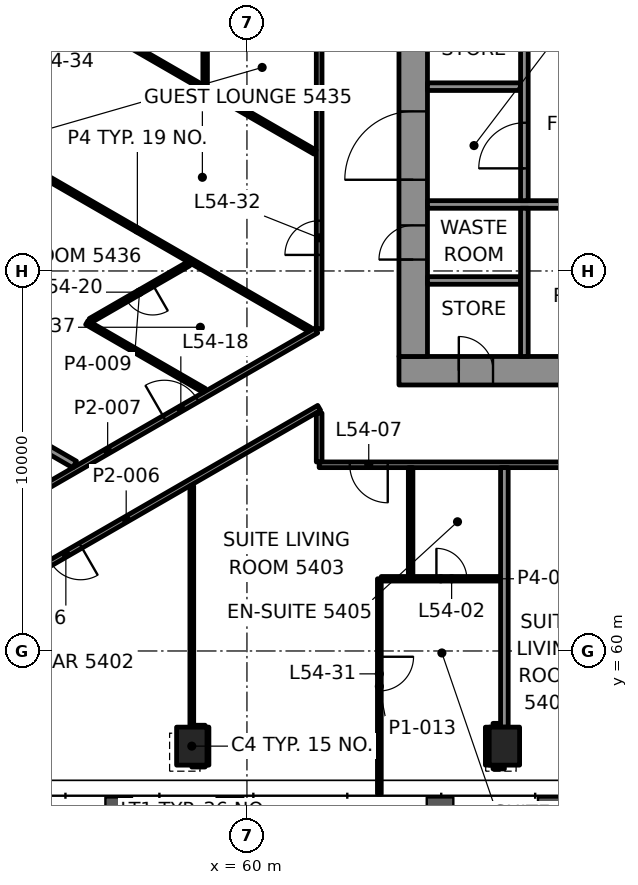
"""IFC4 building model, lengths in metres.
Left out: names, types, materials, properties, quantities, classifications, styles, units other than length and angle.
Written with IfcOpenShell. Run it as: python <this file> out.ifc"""

import sys

from ifc_helpers import new_model, si_unit, direction, frame, frame_2d, origin, origin_2d, place, context, subcontext, project, spatial, rectangle, hollow_rectangle, extrude, element, fill, save


model = new_model("IFC4")
c1 = context("Model", 3, precision=1e-05, world=origin(), true_north=direction((0.0, 1.0)))
c2 = subcontext(c1, "Body", "Model", "MODEL_VIEW")
j1 = project(units=[si_unit("LENGTHUNIT", "METRE"), si_unit("PLANEANGLEUNIT", "RADIAN")], contexts=[c1])
p1 = place(None, origin())
s1 = spatial("IfcSite", under=j1, at=p1, CompositionType="ELEMENT")
p2 = place(p1, origin())
s2 = spatial("IfcBuilding", under=s1, at=p2, CompositionType="ELEMENT")
p3 = place(p2, frame((0.0, 0.0, 229.9)))
s3 = spatial("IfcBuildingStorey", under=s2, at=p3, CompositionType="ELEMENT", Elevation=229.9)
for number, where, z_axis, x_axis in (
    (1, (58.549, 57.496, -0.0), (0.0, 0.0, 1.0), (1.0, 0.0, 0.0)),
    (2, (66.774, 57.496, -0.0), (0.0, 0.0, 1.0), (1.0, 0.0, 0.0)),
):
    element("IfcColumn", number, at=place(p3, frame(where, z_axis=z_axis, x_axis=x_axis)), inside=s3, PredefinedType="COLUMN", context=c2, shape_type="SweptSolid", body=[
        extrude(hollow_rectangle(XDim=0.8, YDim=1.0, WallThickness=0.05, at=origin_2d()), origin(), (0.0, 0.0, 1.0), 3.9),
    ])
p4 = place(p3, frame((64.0, 67.375, 0.0), z_axis=(0.0, 0.0, 1.0), x_axis=(1.0, 0.0, 0.0)))
e3 = element("IfcWall", 3, at=p4, inside=s3, PredefinedType="SHEAR", context=c2, shape_type="SweptSolid", body=[
    extrude(rectangle(XDim=22.0, YDim=0.75, at=frame_2d((11.0, 0.0))), origin(), (0.0, 0.0, 1.0), 3.7),
])
p5 = place(p4, frame((1.575, 0.0, 0.0)))
e4 = element("IfcOpeningElement", 4, at=p5, cuts=e3, PredefinedType="OPENING", context=c2, shape_type="SweptSolid", body=[
    extrude(rectangle(XDim=0.9, YDim=2.1, at=frame_2d((0.45, 1.05))), frame((0.0, 0.385, 0.0), z_axis=(0.0, -1.0, 0.0), x_axis=(1.0, 0.0, 0.0)), (0.0, 0.0, 1.0), 0.77),
])
p6 = place(p4, frame((4.425, 0.0, 0.0)))
e5 = element("IfcOpeningElement", 5, at=p6, cuts=e3, PredefinedType="OPENING", context=c2, shape_type="SweptSolid", body=[
    extrude(rectangle(XDim=0.9, YDim=2.1, at=frame_2d((0.45, 1.05))), frame((0.0, 0.385, 0.0), z_axis=(0.0, -1.0, 0.0), x_axis=(1.0, 0.0, 0.0)), (0.0, 0.0, 1.0), 0.77),
])
p7 = place(p3, frame((64.375, 67.75, 0.0), z_axis=(0.0, 0.0, 1.0), x_axis=(0.0, 1.0, 0.0)))
e6 = element("IfcWall", 6, at=p7, inside=s3, PredefinedType="SHEAR", context=c2, shape_type="SweptSolid", body=[
    extrude(rectangle(XDim=14.5, YDim=0.75, at=frame_2d((7.25, 0.0))), origin(), (0.0, 0.0, 1.0), 3.7),
])
p8 = place(p7, frame((4.65, 0.0, 0.0)))
e7 = element("IfcOpeningElement", 7, at=p8, cuts=e6, PredefinedType="OPENING", context=c2, shape_type="SweptSolid", body=[
    extrude(rectangle(XDim=1.8, YDim=2.1, at=frame_2d((0.9, 1.05))), frame((0.0, 0.385, 0.0), z_axis=(0.0, -1.0, 0.0), x_axis=(1.0, 0.0, 0.0)), (0.0, 0.0, 1.0), 0.77),
])
p9 = place(p7, frame((2.55, 0.0, 0.0)))
e8 = element("IfcOpeningElement", 8, at=p9, cuts=e6, PredefinedType="OPENING", context=c2, shape_type="SweptSolid", body=[
    extrude(rectangle(XDim=0.9, YDim=2.1, at=frame_2d((0.45, 1.05))), frame((0.0, 0.385, 0.0), z_axis=(0.0, -1.0, 0.0), x_axis=(1.0, 0.0, 0.0)), (0.0, 0.0, 1.0), 0.77),
])
p10 = place(p7, frame((10.35, 0.0, 0.0)))
e9 = element("IfcOpeningElement", 9, at=p10, cuts=e6, PredefinedType="OPENING", context=c2, shape_type="SweptSolid", body=[
    extrude(rectangle(XDim=0.9, YDim=2.1, at=frame_2d((0.45, 1.05))), frame((0.0, 0.385, 0.0), z_axis=(0.0, -1.0, 0.0), x_axis=(1.0, 0.0, 0.0)), (0.0, 0.0, 1.0), 0.77),
])
p11 = place(p3, frame((58.549, 56.996, 0.0), z_axis=(0.0, 0.0, 1.0), x_axis=(1.0, 0.0, 0.0)))
e10 = element("IfcWall", 10, at=p11, inside=s3, PredefinedType="PARTITIONING", context=c2, shape_type="SweptSolid", body=[
    extrude(rectangle(XDim=0.35, YDim=0.1, at=frame_2d((0.175, 0.0))), origin(), (0.0, 0.0, 1.0), 3.1),
])
p12 = place(p3, frame((66.475, 56.996, 0.0), z_axis=(0.0, 0.0, 1.0), x_axis=(1.0, 0.0, 0.0)))
e11 = element("IfcWall", 11, at=p12, inside=s3, PredefinedType="PARTITIONING", context=c2, shape_type="SweptSolid", body=[
    extrude(rectangle(XDim=0.299, YDim=0.2, at=frame_2d((0.149, 0.0))), origin(), (0.0, 0.0, 1.0), 3.1),
])
p13 = place(p3, frame((58.609, 57.996, 0.0), z_axis=(0.0, 0.0, 1.0), x_axis=(1.0, 0.0, 0.0)))
e12 = element("IfcWall", 12, at=p13, inside=s3, PredefinedType="PARTITIONING", context=c2, shape_type="SweptSolid", body=[
    extrude(rectangle(XDim=0.29, YDim=0.1, at=frame_2d((0.145, 0.0))), origin(), (0.0, 0.0, 1.0), 3.1),
])
p14 = place(p3, frame((66.475, 57.996, 0.0), z_axis=(0.0, 0.0, 1.0), x_axis=(1.0, 0.0, 0.0)))
e13 = element("IfcWall", 13, at=p14, inside=s3, PredefinedType="PARTITIONING", context=c2, shape_type="SweptSolid", body=[
    extrude(rectangle(XDim=0.199, YDim=0.2, at=frame_2d((0.1, 0.0))), origin(), (0.0, 0.0, 1.0), 3.1),
])
p15 = place(p3, frame((63.534, 61.9, 0.0), z_axis=(0.0, 0.0, 1.0), x_axis=(1.0, 0.0, 0.0)))
e14 = element("IfcWall", 14, at=p15, inside=s3, PredefinedType="PARTITIONING", context=c2, shape_type="SweptSolid", body=[
    extrude(rectangle(XDim=3.13, YDim=0.12, at=frame_2d((1.565, 0.0))), origin(), (0.0, 0.0, 1.0), 3.1),
])
p16 = place(p15, frame((1.451, 0.0, 0.0)))
e15 = element("IfcOpeningElement", 15, at=p16, cuts=e14, PredefinedType="OPENING", context=c2, shape_type="SweptSolid", body=[
    extrude(rectangle(XDim=0.8, YDim=2.1, at=frame_2d((0.4, 1.05))), frame((0.0, 0.07, 0.0), z_axis=(0.0, -1.0, 0.0), x_axis=(1.0, 0.0, 0.0)), (0.0, 0.0, 1.0), 0.14),
])
p17 = place(p3, frame((88.099, 64.9, 0.0), z_axis=(0.0, 0.0, 1.0), x_axis=(-1.0, 0.0, 0.0)))
e16 = element("IfcWall", 16, at=p17, inside=s3, PredefinedType="PARTITIONING", context=c2, shape_type="SweptSolid", body=[
    extrude(rectangle(XDim=26.199, YDim=0.15, at=frame_2d((13.1, 0.0))), origin(), (0.0, 0.0, 1.0), 3.1),
])
p18 = place(p17, frame((2.088, 0.0, 0.0)))
e17 = element("IfcOpeningElement", 17, at=p18, cuts=e16, PredefinedType="OPENING", context=c2, shape_type="SweptSolid", body=[
    extrude(rectangle(XDim=0.9, YDim=2.1, at=frame_2d((0.45, 1.05))), frame((0.0, 0.085, 0.0), z_axis=(0.0, -1.0, 0.0), x_axis=(1.0, 0.0, 0.0)), (0.0, 0.0, 1.0), 0.17),
])
p19 = place(p17, frame((5.4, 0.0, 0.0)))
e18 = element("IfcOpeningElement", 18, at=p19, cuts=e16, PredefinedType="OPENING", context=c2, shape_type="SweptSolid", body=[
    extrude(rectangle(XDim=1.0, YDim=2.1, at=frame_2d((0.5, 1.05))), frame((0.0, 0.085, 0.0), z_axis=(0.0, -1.0, 0.0), x_axis=(1.0, 0.0, 0.0)), (0.0, 0.0, 1.0), 0.17),
])
p20 = place(p17, frame((17.946, 0.0, 0.0)))
e19 = element("IfcOpeningElement", 19, at=p20, cuts=e16, PredefinedType="OPENING", context=c2, shape_type="SweptSolid", body=[
    extrude(rectangle(XDim=1.0, YDim=2.1, at=frame_2d((0.5, 1.05))), frame((0.0, 0.085, 0.0), z_axis=(0.0, -1.0, 0.0), x_axis=(1.0, 0.0, 0.0)), (0.0, 0.0, 1.0), 0.17),
])
p21 = place(p17, frame((24.395, 0.0, 0.0)))
e20 = element("IfcOpeningElement", 20, at=p21, cuts=e16, PredefinedType="OPENING", context=c2, shape_type="SweptSolid", body=[
    extrude(rectangle(XDim=1.0, YDim=2.1, at=frame_2d((0.5, 1.05))), frame((0.0, 0.085, 0.0), z_axis=(0.0, -1.0, 0.0), x_axis=(1.0, 0.0, 0.0)), (0.0, 0.0, 1.0), 0.17),
])
p22 = place(p3, frame((61.9, 66.397, 0.0), z_axis=(0.0, 0.0, 1.0), x_axis=(-0.866028172479, -0.49999520445, 0.0)))
e21 = element("IfcWall", 21, at=p22, inside=s3, PredefinedType="PARTITIONING", context=c2, shape_type="SweptSolid", body=[
    extrude(rectangle(XDim=11.726, YDim=0.15, at=frame_2d((5.863, 0.0))), origin(), (0.0, 0.0, 1.0), 2.947),
])
p23 = place(p22, frame((7.246, 0.0, 0.0)))
e22 = element("IfcOpeningElement", 22, at=p23, cuts=e21, PredefinedType="OPENING", context=c2, shape_type="SweptSolid", body=[
    extrude(rectangle(XDim=0.9, YDim=2.1, at=frame_2d((0.45, 1.05))), frame((0.0, 0.085, 0.0), z_axis=(0.0, -1.0, 0.0), x_axis=(1.0, 0.0, 0.0)), (0.0, 0.0, 1.0), 0.17),
])
p24 = place(p3, frame((50.844, 62.093, 0.0), z_axis=(0.0, 0.0, 1.0), x_axis=(0.866032955338, 0.499986920098, 0.0)))
e23 = element("IfcWall", 23, at=p24, inside=s3, PredefinedType="PARTITIONING", context=c2, shape_type="SweptSolid", body=[
    extrude(rectangle(XDim=12.679, YDim=0.15, at=frame_2d((6.339, 0.0))), origin(), (0.0, 0.0, 1.0), 3.1),
])
p25 = place(p24, frame((0.175, 0.0, 0.0)))
e24 = element("IfcOpeningElement", 24, at=p25, cuts=e23, PredefinedType="OPENING", context=c2, shape_type="SweptSolid", body=[
    extrude(rectangle(XDim=1.0, YDim=2.1, at=frame_2d((0.5, 1.05))), frame((0.0, 0.085, 0.0), z_axis=(0.0, -1.0, 0.0), x_axis=(1.0, 0.0, 0.0)), (0.0, 0.0, 1.0), 0.17),
])
p26 = place(p24, frame((8.063, 0.0, 0.0)))
e25 = element("IfcOpeningElement", 25, at=p26, cuts=e23, PredefinedType="OPENING", context=c2, shape_type="SweptSolid", body=[
    extrude(rectangle(XDim=1.0, YDim=2.1, at=frame_2d((0.5, 1.05))), frame((0.0, 0.085, 0.0), z_axis=(0.0, -1.0, 0.0), x_axis=(1.0, 0.0, 0.0)), (0.0, 0.0, 1.0), 0.17),
])
p27 = place(p3, frame((58.467, 70.189, 0.0), z_axis=(0.0, 0.0, 1.0), x_axis=(-0.86604676013, -0.4999630079, 0.0)))
e26 = element("IfcWall", 26, at=p27, inside=s3, PredefinedType="PARTITIONING", context=c2, shape_type="SweptSolid", body=[
    extrude(rectangle(XDim=2.987, YDim=0.12, at=frame_2d((1.494, 0.0))), origin(), (0.0, 0.0, 1.0), 3.1),
])
p28 = place(p27, frame((1.094, 0.0, 0.0)))
e27 = element("IfcOpeningElement", 27, at=p28, cuts=e26, PredefinedType="OPENING", context=c2, shape_type="SweptSolid", body=[
    extrude(rectangle(XDim=0.8, YDim=2.1, at=frame_2d((0.4, 1.05))), frame((0.0, 0.07, 0.0), z_axis=(0.0, -1.0, 0.0), x_axis=(1.0, 0.0, 0.0)), (0.0, 0.0, 1.0), 0.14),
])
p29 = place(p3, frame((66.774, 57.997, 0.0), z_axis=(0.0, 0.0, 1.0), x_axis=(0.0, 1.0, 0.0)))
e28 = element("IfcWall", 28, at=p29, inside=s3, PredefinedType="PARTITIONING", context=c2, shape_type="SweptSolid", body=[
    extrude(rectangle(XDim=6.828, YDim=0.2, at=frame_2d((3.414, 0.0))), origin(), (0.0, 0.0, 1.0), 3.1),
])
p30 = place(p3, frame((66.374, 56.997, 0.0), z_axis=(0.0, 0.0, 1.0), x_axis=(0.0, 1.0, 0.0)))
e29 = element("IfcWall", 29, at=p30, inside=s3, PredefinedType="PARTITIONING", context=c2, shape_type="SweptSolid", body=[
    extrude(rectangle(XDim=0.999, YDim=0.2, at=frame_2d((0.5, 0.0))), origin(), (0.0, 0.0, 1.0), 3.022),
])
p31 = place(p3, frame((64.307, 61.96, 0.0), z_axis=(0.0, 0.0, 1.0), x_axis=(0.0, 1.0, 0.0)))
e30 = element("IfcWall", 30, at=p31, inside=s3, PredefinedType="PARTITIONING", context=c2, shape_type="SweptSolid", body=[
    extrude(rectangle(XDim=2.865, YDim=0.12, at=frame_2d((1.433, 0.0))), origin(), (0.0, 0.0, 1.0), 3.1),
])
p32 = place(p3, frame((63.484, 61.9, 0.0), z_axis=(0.0, 0.0, 1.0), x_axis=(0.0, -1.0, 0.0)))
e31 = element("IfcWall", 31, at=p32, inside=s3, PredefinedType="PARTITIONING", context=c2, shape_type="SweptSolid", body=[
    extrude(rectangle(XDim=5.664, YDim=0.1, at=frame_2d((2.832, 0.0))), origin(), (0.0, 0.0, 1.0), 3.022),
])
p33 = place(p32, frame((2.052, 0.0, 0.0)))
e32 = element("IfcOpeningElement", 32, at=p33, cuts=e31, PredefinedType="OPENING", context=c2, shape_type="SweptSolid", body=[
    extrude(rectangle(XDim=0.9, YDim=2.1, at=frame_2d((0.45, 1.05))), frame((0.0, 0.06, 0.0), z_axis=(0.0, -1.0, 0.0), x_axis=(1.0, 0.0, 0.0)), (0.0, 0.0, 1.0), 0.12),
])
p34 = place(p3, frame((61.9, 64.975, 0.0), z_axis=(0.0, 0.0, 1.0), x_axis=(0.0, 1.0, 0.0)))
e33 = element("IfcWall", 33, at=p34, inside=s3, PredefinedType="PARTITIONING", context=c2, shape_type="SweptSolid", body=[
    extrude(rectangle(XDim=1.286, YDim=0.15, at=frame_2d((0.643, 0.0))), origin(), (0.0, 0.0, 1.0), 2.947),
])
p35 = place(p3, frame((61.9, 68.476, 0.0), z_axis=(0.0, 0.0, 1.0), x_axis=(0.0, 1.0, 0.0)))
e34 = element("IfcWall", 34, at=p35, inside=s3, PredefinedType="PARTITIONING", context=c2, shape_type="SweptSolid", body=[
    extrude(rectangle(XDim=16.624, YDim=0.15, at=frame_2d((8.312, 0.0))), origin(), (0.0, 0.0, 1.0), 3.1),
])
p36 = place(p35, frame((1.946, 0.0, 0.0)))
e35 = element("IfcOpeningElement", 35, at=p36, cuts=e34, PredefinedType="OPENING", context=c2, shape_type="SweptSolid", body=[
    extrude(rectangle(XDim=0.9, YDim=2.1, at=frame_2d((0.45, 1.05))), frame((0.0, 0.085, 0.0), z_axis=(0.0, -1.0, 0.0), x_axis=(1.0, 0.0, 0.0)), (0.0, 0.0, 1.0), 0.17),
])
p37 = place(p35, frame((10.263, 0.0, 0.0)))
e36 = element("IfcOpeningElement", 36, at=p37, cuts=e34, PredefinedType="OPENING", context=c2, shape_type="SweptSolid", body=[
    extrude(rectangle(XDim=1.0, YDim=2.1, at=frame_2d((0.5, 1.05))), frame((0.0, 0.085, 0.0), z_axis=(0.0, -1.0, 0.0), x_axis=(1.0, 0.0, 0.0)), (0.0, 0.0, 1.0), 0.17),
])
p38 = place(p3, frame((58.949, 56.996, 0.0), z_axis=(0.0, 0.0, 1.0), x_axis=(0.0, 1.0, 0.0)))
e37 = element("IfcWall", 37, at=p38, inside=s3, PredefinedType="PARTITIONING", context=c2, shape_type="SweptSolid", body=[
    extrude(rectangle(XDim=1.0, YDim=0.1, at=frame_2d((0.5, 0.0))), origin(), (0.0, 0.0, 1.0), 3.022),
])
p39 = place(p3, frame((58.9, 78.596, 0.0), z_axis=(0.0, 0.0, 1.0), x_axis=(0.0, -1.0, 0.0)))
e38 = element("IfcWall", 38, at=p39, inside=s3, PredefinedType="PARTITIONING", context=c2, shape_type="SweptSolid", body=[
    extrude(rectangle(XDim=3.69, YDim=0.12, at=frame_2d((1.845, 0.0))), origin(), (0.0, 0.0, 1.0), 3.1),
])
p40 = place(p39, frame((1.82, 0.0, 0.0)))
e39 = element("IfcOpeningElement", 39, at=p40, cuts=e38, PredefinedType="OPENING", context=c2, shape_type="SweptSolid", body=[
    extrude(rectangle(XDim=0.8, YDim=2.1, at=frame_2d((0.4, 1.05))), frame((0.0, 0.07, 0.0), z_axis=(0.0, -1.0, 0.0), x_axis=(1.0, 0.0, 0.0)), (0.0, 0.0, 1.0), 0.14),
])
p41 = place(p3, frame((58.549, 57.996, 0.0), z_axis=(0.0, 0.0, 1.0), x_axis=(0.0, 1.0, 0.0)))
e40 = element("IfcWall", 40, at=p41, inside=s3, PredefinedType="PARTITIONING", context=c2, shape_type="SweptSolid", body=[
    extrude(rectangle(XDim=6.35, YDim=0.1, at=frame_2d((3.175, 0.0))), origin(), (0.0, 0.0, 1.0), 2.947),
])
p42 = place(p3, frame((61.79, 73.128, 0.0), z_axis=(0.0, 0.0, 1.0), x_axis=(-0.866022320763, 0.500005339912, 0.0)))
e41 = element("IfcWall", 41, at=p42, inside=s3, PredefinedType="PARTITIONING", context=c2, shape_type="SweptSolid", body=[
    extrude(rectangle(XDim=6.5, YDim=0.12, at=frame_2d((3.25, 0.0))), origin(), (0.0, 0.0, 1.0), 3.1),
])
p43 = place(p3, frame((61.652, 68.46, 0.0), z_axis=(0.0, 0.0, 1.0), x_axis=(-0.866025672267, 0.499999534974, 0.0)))
e42 = element("IfcWall", 42, at=p43, inside=s3, PredefinedType="PARTITIONING", context=c2, shape_type="SweptSolid", body=[
    extrude(rectangle(XDim=10.475, YDim=0.12, at=frame_2d((5.237, 0.0))), origin(), (0.0, 0.0, 1.0), 3.022),
])
p44 = place(p3, frame((58.876, 66.856, 0.0), z_axis=(0.0, 0.0, 1.0), x_axis=(-0.866028357664, 0.499994883695, 0.0)))
e43 = element("IfcWall", 43, at=p44, inside=s3, PredefinedType="PARTITIONING", context=c2, shape_type="SweptSolid", body=[
    extrude(rectangle(XDim=3.568, YDim=0.12, at=frame_2d((1.784, 0.0))), origin(), (0.0, 0.0, 1.0), 3.1),
])
p45 = place(p3, frame((55.465, 64.907, 0.0), z_axis=(0.0, 0.0, 1.0), x_axis=(-0.866022205013, 0.500005540394, 0.0)))
e44 = element("IfcWall", 44, at=p45, inside=s3, PredefinedType="PARTITIONING", context=c2, shape_type="SweptSolid", body=[
    extrude(rectangle(XDim=6.893, YDim=0.2, at=frame_2d((3.447, 0.0))), origin(), (0.0, 0.0, 1.0), 3.1),
])
p46 = place(p3, frame((64.75, 69.75, 0.0), z_axis=(0.0, 0.0, 1.0), x_axis=(1.0, 0.0, 0.0)))
e45 = element("IfcWall", 45, at=p46, inside=s3, PredefinedType="PARTITIONING", context=c2, shape_type="SweptSolid", body=[
    extrude(rectangle(XDim=2.45, YDim=0.2, at=frame_2d((1.225, 0.0))), origin(), (0.0, 0.0, 1.0), 3.7),
])
p47 = place(p3, frame((64.75, 71.75, 0.0), z_axis=(0.0, 0.0, 1.0), x_axis=(1.0, 0.0, 0.0)))
e46 = element("IfcWall", 46, at=p47, inside=s3, PredefinedType="PARTITIONING", context=c2, shape_type="SweptSolid", body=[
    extrude(rectangle(XDim=5.55, YDim=0.2, at=frame_2d((2.775, 0.0))), origin(), (0.0, 0.0, 1.0), 3.7),
])
p48 = place(p3, frame((64.75, 74.85, 0.0), z_axis=(0.0, 0.0, 1.0), x_axis=(1.0, 0.0, 0.0)))
e47 = element("IfcWall", 47, at=p48, inside=s3, PredefinedType="PARTITIONING", context=c2, shape_type="SweptSolid", body=[
    extrude(rectangle(XDim=2.45, YDim=0.2, at=frame_2d((1.225, 0.0))), origin(), (0.0, 0.0, 1.0), 3.7),
])
p49 = place(p3, frame((67.3, 67.75, 0.0), z_axis=(0.0, 0.0, 1.0), x_axis=(0.0, 1.0, 0.0)))
e48 = element("IfcWall", 48, at=p49, inside=s3, PredefinedType="PARTITIONING", context=c2, shape_type="SweptSolid", body=[
    extrude(rectangle(XDim=3.9, YDim=0.2, at=frame_2d((1.95, 0.0))), origin(), (0.0, 0.0, 1.0), 3.7),
])
p50 = place(p3, frame((67.3, 71.85, 0.0), z_axis=(0.0, 0.0, 1.0), x_axis=(0.0, 1.0, 0.0)))
e49 = element("IfcWall", 49, at=p50, inside=s3, PredefinedType="PARTITIONING", context=c2, shape_type="SweptSolid", body=[
    extrude(rectangle(XDim=5.75, YDim=0.2, at=frame_2d((2.875, 0.0))), origin(), (0.0, 0.0, 1.0), 3.7),
])
p51 = place(p50, frame((0.85, 0.0, 0.0)))
e50 = element("IfcOpeningElement", 50, at=p51, cuts=e49, PredefinedType="OPENING", context=c2, shape_type="SweptSolid", body=[
    extrude(rectangle(XDim=1.2, YDim=2.1, at=frame_2d((0.6, 1.05))), frame((0.0, 0.11, 0.0), z_axis=(0.0, -1.0, 0.0), x_axis=(1.0, 0.0, 0.0)), (0.0, 0.0, 1.0), 0.22),
])
p52 = place(p16, origin())
e51 = element("IfcDoor", 51, at=p52, inside=s3, OperationType="SINGLE_SWING_RIGHT", PredefinedType="DOOR", context=c2, shape_type="SweptSolid", body=[
    extrude(rectangle(XDim=0.8, YDim=2.1, at=frame_2d((0.4, 1.05))), frame((0.0, 0.025, 0.0), z_axis=(0.0, -1.0, 0.0), x_axis=(1.0, 0.0, 0.0)), (0.0, 0.0, 1.0), 0.05),
])
fill(e15, e51)
p53 = place(p21, origin())
e52 = element("IfcDoor", 52, at=p53, inside=s3, OperationType="SINGLE_SWING_LEFT", PredefinedType="DOOR", context=c2, shape_type="SweptSolid", body=[
    extrude(rectangle(XDim=1.0, YDim=2.1, at=frame_2d((0.5, 1.05))), frame((0.0, 0.025, 0.0), z_axis=(0.0, -1.0, 0.0), x_axis=(1.0, 0.0, 0.0)), (0.0, 0.0, 1.0), 0.05),
])
fill(e20, e52)
p54 = place(p23, origin())
e53 = element("IfcDoor", 53, at=p54, inside=s3, OperationType="SINGLE_SWING_RIGHT", PredefinedType="DOOR", context=c2, shape_type="SweptSolid", body=[
    extrude(rectangle(XDim=0.9, YDim=2.1, at=frame_2d((0.45, 1.05))), frame((0.0, 0.025, 0.0), z_axis=(0.0, -1.0, 0.0), x_axis=(1.0, 0.0, 0.0)), (0.0, 0.0, 1.0), 0.05),
])
fill(e22, e53)
p55 = place(p26, origin())
e54 = element("IfcDoor", 54, at=p55, inside=s3, OperationType="SINGLE_SWING_LEFT", PredefinedType="DOOR", context=c2, shape_type="SweptSolid", body=[
    extrude(rectangle(XDim=1.0, YDim=2.1, at=frame_2d((0.5, 1.05))), frame((0.0, 0.025, 0.0), z_axis=(0.0, -1.0, 0.0), x_axis=(1.0, 0.0, 0.0)), (0.0, 0.0, 1.0), 0.05),
])
fill(e25, e54)
p56 = place(p28, origin())
e55 = element("IfcDoor", 55, at=p56, inside=s3, OperationType="SINGLE_SWING_LEFT", PredefinedType="DOOR", context=c2, shape_type="SweptSolid", body=[
    extrude(rectangle(XDim=0.8, YDim=2.1, at=frame_2d((0.4, 1.05))), frame((0.0, 0.025, 0.0), z_axis=(0.0, -1.0, 0.0), x_axis=(1.0, 0.0, 0.0)), (0.0, 0.0, 1.0), 0.05),
])
fill(e27, e55)
p57 = place(p33, origin())
e56 = element("IfcDoor", 56, at=p57, inside=s3, OperationType="SINGLE_SWING_RIGHT", PredefinedType="DOOR", context=c2, shape_type="SweptSolid", body=[
    extrude(rectangle(XDim=0.9, YDim=2.1, at=frame_2d((0.45, 1.05))), frame((0.0, 0.025, 0.0), z_axis=(0.0, -1.0, 0.0), x_axis=(1.0, 0.0, 0.0)), (0.0, 0.0, 1.0), 0.05),
])
fill(e32, e56)
p58 = place(p36, origin())
e57 = element("IfcDoor", 57, at=p58, inside=s3, OperationType="SINGLE_SWING_RIGHT", PredefinedType="DOOR", context=c2, shape_type="SweptSolid", body=[
    extrude(rectangle(XDim=0.9, YDim=2.1, at=frame_2d((0.45, 1.05))), frame((0.0, 0.025, 0.0), z_axis=(0.0, -1.0, 0.0), x_axis=(1.0, 0.0, 0.0)), (0.0, 0.0, 1.0), 0.05),
])
fill(e35, e57)
p59 = place(p3, origin())
p60 = place(p59, frame((53.067, 56.191, 0.15), z_axis=(0.0, 0.0, 1.0), x_axis=(1.0, 0.0, 0.0)))
p61 = place(p60, origin())
e58 = element("IfcWindow", 58, at=p61, inside=s3, PartitioningType="SINGLE_PANEL", PredefinedType="WINDOW", context=c2, shape_type="SweptSolid", body=[
    extrude(rectangle(XDim=2.667, YDim=3.55, at=frame_2d((1.333, 1.775))), frame((0.0, 0.03, 0.0), z_axis=(0.0, -1.0, 0.0), x_axis=(1.0, 0.0, 0.0)), (0.0, 0.0, 1.0), 0.06),
])
p62 = place(p51, origin())
e59 = element("IfcDoor", 59, at=p62, inside=s3, OperationType="SINGLE_SWING_RIGHT", PredefinedType="DOOR", context=c2, shape_type="SweptSolid", body=[
    extrude(rectangle(XDim=1.2, YDim=2.1, at=frame_2d((0.6, 1.05))), frame((0.0, 0.025, 0.0), z_axis=(0.0, -1.0, 0.0), x_axis=(1.0, 0.0, 0.0)), (0.0, 0.0, 1.0), 0.05),
])
fill(e50, e59)
p63 = place(p8, origin())
e60 = element("IfcDoor", 60, at=p63, inside=s3, OperationType="SINGLE_SWING_LEFT", PredefinedType="DOOR", context=c2, shape_type="SweptSolid", body=[
    extrude(rectangle(XDim=1.8, YDim=2.1, at=frame_2d((0.9, 1.05))), frame((0.0, 0.095, 0.0), z_axis=(0.0, -1.0, 0.0), x_axis=(1.0, 0.0, 0.0)), (0.0, 0.0, 1.0), 0.19),
])
fill(e7, e60)
p64 = place(p5, origin())
e61 = element("IfcDoor", 61, at=p64, inside=s3, OperationType="SINGLE_SWING_LEFT", PredefinedType="DOOR", context=c2, shape_type="SweptSolid", body=[
    extrude(rectangle(XDim=0.9, YDim=2.1, at=frame_2d((0.45, 1.05))), frame((0.0, 0.095, 0.0), z_axis=(0.0, -1.0, 0.0), x_axis=(1.0, 0.0, 0.0)), (0.0, 0.0, 1.0), 0.19),
])
fill(e4, e61)
p65 = place(p9, origin())
e62 = element("IfcDoor", 62, at=p65, inside=s3, OperationType="SINGLE_SWING_RIGHT", PredefinedType="DOOR", context=c2, shape_type="SweptSolid", body=[
    extrude(rectangle(XDim=0.9, YDim=2.1, at=frame_2d((0.45, 1.05))), frame((0.0, 0.095, 0.0), z_axis=(0.0, -1.0, 0.0), x_axis=(1.0, 0.0, 0.0)), (0.0, 0.0, 1.0), 0.19),
])
fill(e8, e62)
save(model, sys.argv[1])
